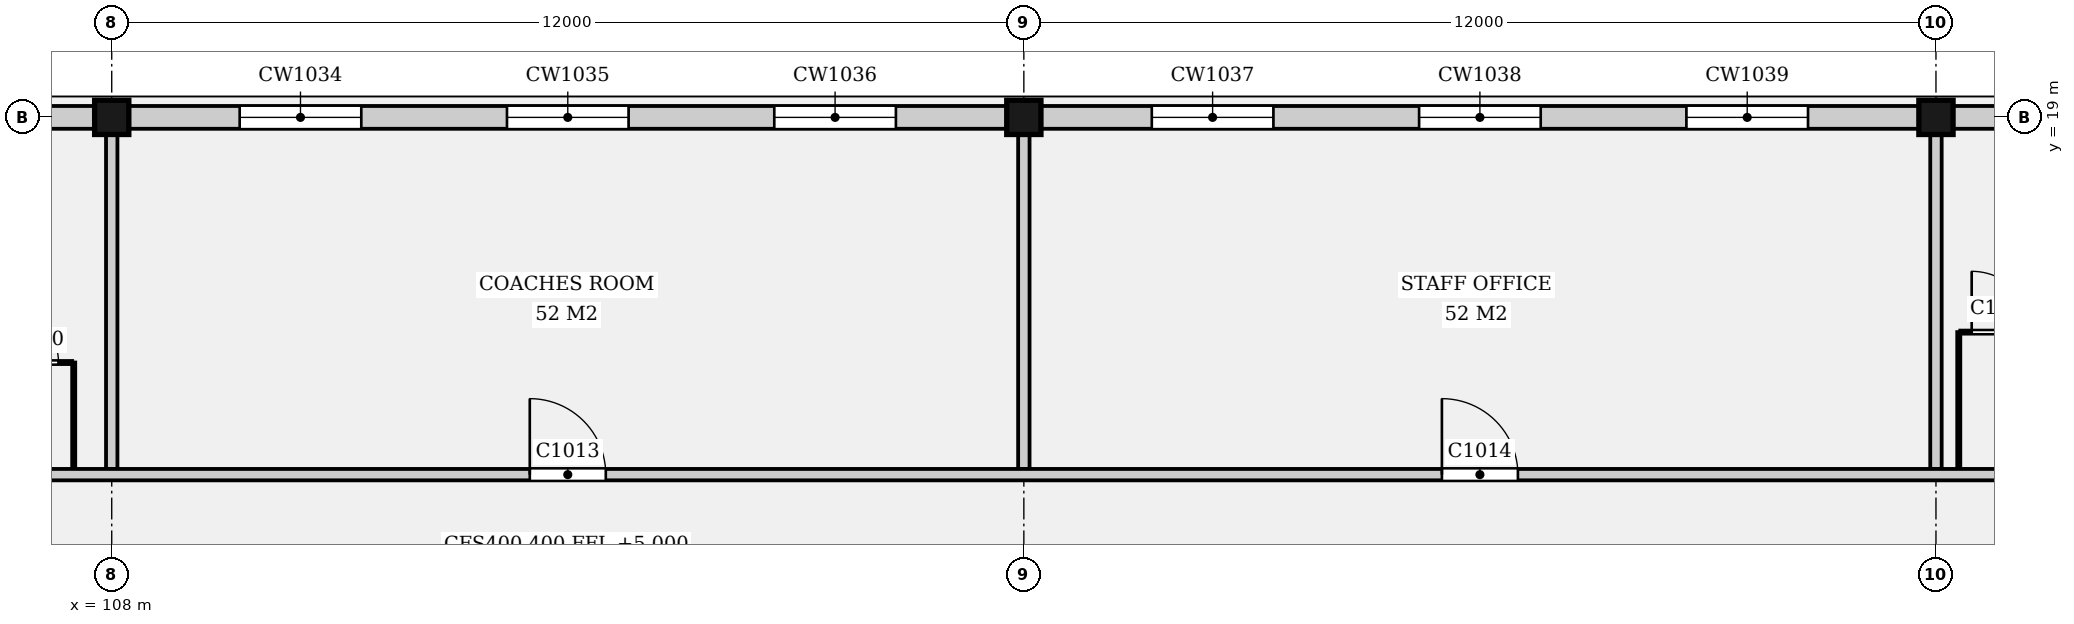
"""IFC4 building model, lengths in metres.
Left out: names, types, materials, properties, quantities, classifications, styles, units other than length and angle.
Written with IfcOpenShell. Run it as: python <this file> out.ifc"""

import sys

from ifc_helpers import new_model, si_unit, direction, frame, frame_2d, origin, origin_2d, place, context, subcontext, project, spatial, rectangle, extrude, element, fill, save


model = new_model("IFC4")
c1 = context("Model", 3, precision=1e-05, world=origin(), true_north=direction((0.0, 1.0)))
c2 = subcontext(c1, "Body", "Model", "MODEL_VIEW")
j1 = project(units=[si_unit("LENGTHUNIT", "METRE"), si_unit("PLANEANGLEUNIT", "RADIAN")], contexts=[c1])
p1 = place(None, origin())
s1 = spatial("IfcSite", under=j1, at=p1, CompositionType="ELEMENT")
p2 = place(p1, origin())
s2 = spatial("IfcBuilding", under=s1, at=p2, CompositionType="ELEMENT")
p3 = place(p2, frame((0.0, 0.0, 5.0)))
s3 = spatial("IfcBuildingStorey", under=s2, at=p3, CompositionType="ELEMENT", Elevation=5.0)
for number, where, z_axis, x_axis in (
    (1, (108.0, 19.0, 0.0), (0.0, 0.0, 1.0), (1.0, 0.0, 0.0)),
    (2, (120.0, 19.0, 0.0), (0.0, 0.0, 1.0), (1.0, 0.0, 0.0)),
    (3, (132.0, 19.0, 0.0), (0.0, 0.0, 1.0), (1.0, 0.0, 0.0)),
):
    element("IfcColumn", number, at=place(p3, frame(where, z_axis=z_axis, x_axis=x_axis)), inside=s3, PredefinedType="COLUMN", context=c2, shape_type="SweptSolid", body=[
        extrude(rectangle(XDim=0.45, YDim=0.45, at=origin_2d()), origin(), (0.0, 0.0, 1.0), 4.4),
    ])
p4 = place(p3, frame((96.225, 19.0, 0.0), z_axis=(0.0, 0.0, 1.0), x_axis=(1.0, 0.0, 0.0)))
e4 = element("IfcWall", 4, at=p4, inside=s3, PredefinedType="ELEMENTEDWALL", context=c2, shape_type="SweptSolid", body=[
    extrude(rectangle(XDim=11.55, YDim=0.3, at=frame_2d((5.775, 0.0))), origin(), (0.0, 0.0, 1.0), 3.98),
])
p5 = place(p4, frame((1.458, 0.0, 1.4)))
e5 = element("IfcOpeningElement", 5, at=p5, cuts=e4, PredefinedType="OPENING", context=c2, shape_type="SweptSolid", body=[
    extrude(rectangle(XDim=1.6, YDim=1.2, at=frame_2d((0.8, 0.6))), frame((0.0, 0.16, 0.0), z_axis=(0.0, -1.0, 0.0), x_axis=(1.0, 0.0, 0.0)), (0.0, 0.0, 1.0), 0.32),
])
p6 = place(p4, frame((4.975, 0.0, 1.4)))
e6 = element("IfcOpeningElement", 6, at=p6, cuts=e4, PredefinedType="OPENING", context=c2, shape_type="SweptSolid", body=[
    extrude(rectangle(XDim=1.6, YDim=1.2, at=frame_2d((0.8, 0.6))), frame((0.0, 0.16, 0.0), z_axis=(0.0, -1.0, 0.0), x_axis=(1.0, 0.0, 0.0)), (0.0, 0.0, 1.0), 0.32),
])
p7 = place(p4, frame((8.492, 0.0, 1.4)))
e7 = element("IfcOpeningElement", 7, at=p7, cuts=e4, PredefinedType="OPENING", context=c2, shape_type="SweptSolid", body=[
    extrude(rectangle(XDim=1.6, YDim=1.2, at=frame_2d((0.8, 0.6))), frame((0.0, 0.16, 0.0), z_axis=(0.0, -1.0, 0.0), x_axis=(1.0, 0.0, 0.0)), (0.0, 0.0, 1.0), 0.32),
])
p8 = place(p3, frame((108.225, 19.0, 0.0), z_axis=(0.0, 0.0, 1.0), x_axis=(1.0, 0.0, 0.0)))
e8 = element("IfcWall", 8, at=p8, inside=s3, PredefinedType="ELEMENTEDWALL", context=c2, shape_type="SweptSolid", body=[
    extrude(rectangle(XDim=11.55, YDim=0.3, at=frame_2d((5.775, 0.0))), origin(), (0.0, 0.0, 1.0), 3.98),
])
p9 = place(p8, frame((1.458, 0.0, 1.4)))
e9 = element("IfcOpeningElement", 9, at=p9, cuts=e8, PredefinedType="OPENING", context=c2, shape_type="SweptSolid", body=[
    extrude(rectangle(XDim=1.6, YDim=1.2, at=frame_2d((0.8, 0.6))), frame((0.0, 0.16, 0.0), z_axis=(0.0, -1.0, 0.0), x_axis=(1.0, 0.0, 0.0)), (0.0, 0.0, 1.0), 0.32),
])
p10 = place(p8, frame((4.975, 0.0, 1.4)))
e10 = element("IfcOpeningElement", 10, at=p10, cuts=e8, PredefinedType="OPENING", context=c2, shape_type="SweptSolid", body=[
    extrude(rectangle(XDim=1.6, YDim=1.2, at=frame_2d((0.8, 0.6))), frame((0.0, 0.16, 0.0), z_axis=(0.0, -1.0, 0.0), x_axis=(1.0, 0.0, 0.0)), (0.0, 0.0, 1.0), 0.32),
])
p11 = place(p8, frame((8.492, 0.0, 1.4)))
e11 = element("IfcOpeningElement", 11, at=p11, cuts=e8, PredefinedType="OPENING", context=c2, shape_type="SweptSolid", body=[
    extrude(rectangle(XDim=1.6, YDim=1.2, at=frame_2d((0.8, 0.6))), frame((0.0, 0.16, 0.0), z_axis=(0.0, -1.0, 0.0), x_axis=(1.0, 0.0, 0.0)), (0.0, 0.0, 1.0), 0.32),
])
p12 = place(p3, frame((120.225, 19.0, 0.0), z_axis=(0.0, 0.0, 1.0), x_axis=(1.0, 0.0, 0.0)))
e12 = element("IfcWall", 12, at=p12, inside=s3, PredefinedType="ELEMENTEDWALL", context=c2, shape_type="SweptSolid", body=[
    extrude(rectangle(XDim=11.55, YDim=0.3, at=frame_2d((5.775, 0.0))), origin(), (0.0, 0.0, 1.0), 3.98),
])
p13 = place(p12, frame((1.458, 0.0, 1.4)))
e13 = element("IfcOpeningElement", 13, at=p13, cuts=e12, PredefinedType="OPENING", context=c2, shape_type="SweptSolid", body=[
    extrude(rectangle(XDim=1.6, YDim=1.2, at=frame_2d((0.8, 0.6))), frame((0.0, 0.16, 0.0), z_axis=(0.0, -1.0, 0.0), x_axis=(1.0, 0.0, 0.0)), (0.0, 0.0, 1.0), 0.32),
])
p14 = place(p12, frame((4.975, 0.0, 1.4)))
e14 = element("IfcOpeningElement", 14, at=p14, cuts=e12, PredefinedType="OPENING", context=c2, shape_type="SweptSolid", body=[
    extrude(rectangle(XDim=1.6, YDim=1.2, at=frame_2d((0.8, 0.6))), frame((0.0, 0.16, 0.0), z_axis=(0.0, -1.0, 0.0), x_axis=(1.0, 0.0, 0.0)), (0.0, 0.0, 1.0), 0.32),
])
p15 = place(p12, frame((8.492, 0.0, 1.4)))
e15 = element("IfcOpeningElement", 15, at=p15, cuts=e12, PredefinedType="OPENING", context=c2, shape_type="SweptSolid", body=[
    extrude(rectangle(XDim=1.6, YDim=1.2, at=frame_2d((0.8, 0.6))), frame((0.0, 0.16, 0.0), z_axis=(0.0, -1.0, 0.0), x_axis=(1.0, 0.0, 0.0)), (0.0, 0.0, 1.0), 0.32),
])
p16 = place(p3, frame((132.225, 19.0, 0.0), z_axis=(0.0, 0.0, 1.0), x_axis=(1.0, 0.0, 0.0)))
e16 = element("IfcWall", 16, at=p16, inside=s3, PredefinedType="ELEMENTEDWALL", context=c2, shape_type="SweptSolid", body=[
    extrude(rectangle(XDim=11.55, YDim=0.3, at=frame_2d((5.775, 0.0))), origin(), (0.0, 0.0, 1.0), 3.98),
])
p17 = place(p16, frame((1.458, 0.0, 1.4)))
e17 = element("IfcOpeningElement", 17, at=p17, cuts=e16, PredefinedType="OPENING", context=c2, shape_type="SweptSolid", body=[
    extrude(rectangle(XDim=1.6, YDim=1.2, at=frame_2d((0.8, 0.6))), frame((0.0, 0.16, 0.0), z_axis=(0.0, -1.0, 0.0), x_axis=(1.0, 0.0, 0.0)), (0.0, 0.0, 1.0), 0.32),
])
p18 = place(p16, frame((4.975, 0.0, 1.4)))
e18 = element("IfcOpeningElement", 18, at=p18, cuts=e16, PredefinedType="OPENING", context=c2, shape_type="SweptSolid", body=[
    extrude(rectangle(XDim=1.6, YDim=1.2, at=frame_2d((0.8, 0.6))), frame((0.0, 0.16, 0.0), z_axis=(0.0, -1.0, 0.0), x_axis=(1.0, 0.0, 0.0)), (0.0, 0.0, 1.0), 0.32),
])
p19 = place(p16, frame((8.492, 0.0, 1.4)))
e19 = element("IfcOpeningElement", 19, at=p19, cuts=e16, PredefinedType="OPENING", context=c2, shape_type="SweptSolid", body=[
    extrude(rectangle(XDim=1.6, YDim=1.2, at=frame_2d((0.8, 0.6))), frame((0.0, 0.16, 0.0), z_axis=(0.0, -1.0, 0.0), x_axis=(1.0, 0.0, 0.0)), (0.0, 0.0, 1.0), 0.32),
])
p20 = place(p3, frame((55.3, 14.3, 0.0), z_axis=(0.0, 0.0, 1.0), x_axis=(1.0, 0.0, 0.0)))
e20 = element("IfcWall", 20, at=p20, inside=s3, PredefinedType="PARTITIONING", context=c2, shape_type="SweptSolid", body=[
    extrude(rectangle(XDim=93.4, YDim=0.15, at=frame_2d((46.7, 0.0))), origin(), (0.0, 0.0, 1.0), 3.98),
])
p21 = place(p20, frame((15.8, 0.0, 0.0)))
e21 = element("IfcOpeningElement", 21, at=p21, cuts=e20, PredefinedType="OPENING", context=c2, shape_type="SweptSolid", body=[
    extrude(rectangle(XDim=1.8, YDim=2.4, at=frame_2d((0.9, 1.2))), frame((0.0, 0.085, 0.0), z_axis=(0.0, -1.0, 0.0), x_axis=(1.0, 0.0, 0.0)), (0.0, 0.0, 1.0), 0.17),
])
p22 = place(p20, frame((32.2, 0.0, 0.0)))
e22 = element("IfcOpeningElement", 22, at=p22, cuts=e20, PredefinedType="OPENING", context=c2, shape_type="SweptSolid", body=[
    extrude(rectangle(XDim=1.0, YDim=2.1, at=frame_2d((0.5, 1.05))), frame((0.0, 0.085, 0.0), z_axis=(0.0, -1.0, 0.0), x_axis=(1.0, 0.0, 0.0)), (0.0, 0.0, 1.0), 0.17),
])
p23 = place(p20, frame((38.2, 0.0, 0.0)))
e23 = element("IfcOpeningElement", 23, at=p23, cuts=e20, PredefinedType="OPENING", context=c2, shape_type="SweptSolid", body=[
    extrude(rectangle(XDim=1.0, YDim=2.1, at=frame_2d((0.5, 1.05))), frame((0.0, 0.085, 0.0), z_axis=(0.0, -1.0, 0.0), x_axis=(1.0, 0.0, 0.0)), (0.0, 0.0, 1.0), 0.17),
])
p24 = place(p20, frame((45.7, 0.0, 0.0)))
e24 = element("IfcOpeningElement", 24, at=p24, cuts=e20, PredefinedType="OPENING", context=c2, shape_type="SweptSolid", body=[
    extrude(rectangle(XDim=0.9, YDim=2.1, at=frame_2d((0.45, 1.05))), frame((0.0, 0.085, 0.0), z_axis=(0.0, -1.0, 0.0), x_axis=(1.0, 0.0, 0.0)), (0.0, 0.0, 1.0), 0.17),
])
p25 = place(p20, frame((58.2, 0.0, 0.0)))
e25 = element("IfcOpeningElement", 25, at=p25, cuts=e20, PredefinedType="OPENING", context=c2, shape_type="SweptSolid", body=[
    extrude(rectangle(XDim=1.0, YDim=2.1, at=frame_2d((0.5, 1.05))), frame((0.0, 0.085, 0.0), z_axis=(0.0, -1.0, 0.0), x_axis=(1.0, 0.0, 0.0)), (0.0, 0.0, 1.0), 0.17),
])
p26 = place(p20, frame((70.2, 0.0, 0.0)))
e26 = element("IfcOpeningElement", 26, at=p26, cuts=e20, PredefinedType="OPENING", context=c2, shape_type="SweptSolid", body=[
    extrude(rectangle(XDim=1.0, YDim=2.1, at=frame_2d((0.5, 1.05))), frame((0.0, 0.085, 0.0), z_axis=(0.0, -1.0, 0.0), x_axis=(1.0, 0.0, 0.0)), (0.0, 0.0, 1.0), 0.17),
])
p27 = place(p20, frame((81.68, 0.0, 0.0)))
e27 = element("IfcOpeningElement", 27, at=p27, cuts=e20, PredefinedType="OPENING", context=c2, shape_type="SweptSolid", body=[
    extrude(rectangle(XDim=0.9, YDim=2.1, at=frame_2d((0.45, 1.05))), frame((0.0, 0.085, 0.0), z_axis=(0.0, -1.0, 0.0), x_axis=(1.0, 0.0, 0.0)), (0.0, 0.0, 1.0), 0.17),
])
for number, where, z_axis, x_axis in (
    (28, (108.0, 14.375, 0.0), (0.0, 0.0, 1.0), (0.0, 1.0, 0.0)),
    (29, (120.0, 14.375, 0.0), (0.0, 0.0, 1.0), (0.0, 1.0, 0.0)),
    (30, (132.0, 14.375, 0.0), (0.0, 0.0, 1.0), (0.0, 1.0, 0.0)),
):
    element("IfcWall", number, at=place(p3, frame(where, z_axis=z_axis, x_axis=x_axis)), inside=s3, PredefinedType="PARTITIONING", context=c2, shape_type="SweptSolid", body=[
        extrude(rectangle(XDim=4.4, YDim=0.15, at=frame_2d((2.2, 0.0))), origin(), (0.0, 0.0, 1.0), 3.98),
    ])
p28 = place(p3, frame((107.5, 14.375, 0.0), z_axis=(0.0, 0.0, 1.0), x_axis=(0.0, 1.0, 0.0)))
e31 = element("IfcWall", 31, at=p28, inside=s3, PredefinedType="PARTITIONING", context=c2, shape_type="SweptSolid", body=[
    extrude(rectangle(XDim=1.4, YDim=0.04, at=frame_2d((0.7, 0.0))), origin(), (0.0, 0.0, 1.0), 2.4),
])
p29 = place(p3, frame((106.42, 15.775, 0.0), z_axis=(0.0, 0.0, 1.0), x_axis=(1.0, 0.0, 0.0)))
e32 = element("IfcWall", 32, at=p29, inside=s3, PredefinedType="PARTITIONING", context=c2, shape_type="SweptSolid", body=[
    extrude(rectangle(XDim=1.06, YDim=0.04, at=frame_2d((0.53, 0.0))), origin(), (0.0, 0.0, 1.0), 2.4),
])
p30 = place(p29, frame((0.18, 0.0, 0.0)))
e33 = element("IfcOpeningElement", 33, at=p30, cuts=e32, PredefinedType="OPENING", context=c2, shape_type="SweptSolid", body=[
    extrude(rectangle(XDim=0.7, YDim=2.0, at=frame_2d((0.35, 1.0))), frame((0.0, 0.03, 0.0), z_axis=(0.0, -1.0, 0.0), x_axis=(1.0, 0.0, 0.0)), (0.0, 0.0, 1.0), 0.06),
])
p31 = place(p3, frame((132.3, 14.375, 0.0), z_axis=(0.0, 0.0, 1.0), x_axis=(0.0, 1.0, 0.0)))
e34 = element("IfcWall", 34, at=p31, inside=s3, PredefinedType="PARTITIONING", context=c2, shape_type="SweptSolid", body=[
    extrude(rectangle(XDim=1.8, YDim=0.04, at=frame_2d((0.9, 0.0))), origin(), (0.0, 0.0, 1.0), 2.4),
])
p32 = place(p3, frame((132.32, 16.175, 0.0), z_axis=(0.0, 0.0, 1.0), x_axis=(1.0, 0.0, 0.0)))
e35 = element("IfcWall", 35, at=p32, inside=s3, PredefinedType="PARTITIONING", context=c2, shape_type="SweptSolid", body=[
    extrude(rectangle(XDim=1.1, YDim=0.04, at=frame_2d((0.55, 0.0))), origin(), (0.0, 0.0, 1.0), 2.4),
])
p33 = place(p32, frame((0.15, 0.0, 0.0)))
e36 = element("IfcOpeningElement", 36, at=p33, cuts=e35, PredefinedType="OPENING", context=c2, shape_type="SweptSolid", body=[
    extrude(rectangle(XDim=0.8, YDim=2.0, at=frame_2d((0.4, 1.0))), frame((0.0, 0.03, 0.0), z_axis=(0.0, -1.0, 0.0), x_axis=(1.0, 0.0, 0.0)), (0.0, 0.0, 1.0), 0.06),
])
p34 = place(p9, origin())
e37 = element("IfcWindow", 37, at=p34, inside=s3, PartitioningType="SINGLE_PANEL", PredefinedType="WINDOW", context=c2, shape_type="SweptSolid", body=[
    extrude(rectangle(XDim=1.6, YDim=1.2, at=frame_2d((0.8, 0.6))), frame((0.0, 0.03, 0.0), z_axis=(0.0, -1.0, 0.0), x_axis=(1.0, 0.0, 0.0)), (0.0, 0.0, 1.0), 0.06),
])
fill(e9, e37)
p35 = place(p10, origin())
e38 = element("IfcWindow", 38, at=p35, inside=s3, PartitioningType="SINGLE_PANEL", PredefinedType="WINDOW", context=c2, shape_type="SweptSolid", body=[
    extrude(rectangle(XDim=1.6, YDim=1.2, at=frame_2d((0.8, 0.6))), frame((0.0, 0.03, 0.0), z_axis=(0.0, -1.0, 0.0), x_axis=(1.0, 0.0, 0.0)), (0.0, 0.0, 1.0), 0.06),
])
fill(e10, e38)
p36 = place(p11, origin())
e39 = element("IfcWindow", 39, at=p36, inside=s3, PartitioningType="SINGLE_PANEL", PredefinedType="WINDOW", context=c2, shape_type="SweptSolid", body=[
    extrude(rectangle(XDim=1.6, YDim=1.2, at=frame_2d((0.8, 0.6))), frame((0.0, 0.03, 0.0), z_axis=(0.0, -1.0, 0.0), x_axis=(1.0, 0.0, 0.0)), (0.0, 0.0, 1.0), 0.06),
])
fill(e11, e39)
p37 = place(p13, origin())
e40 = element("IfcWindow", 40, at=p37, inside=s3, PartitioningType="SINGLE_PANEL", PredefinedType="WINDOW", context=c2, shape_type="SweptSolid", body=[
    extrude(rectangle(XDim=1.6, YDim=1.2, at=frame_2d((0.8, 0.6))), frame((0.0, 0.03, 0.0), z_axis=(0.0, -1.0, 0.0), x_axis=(1.0, 0.0, 0.0)), (0.0, 0.0, 1.0), 0.06),
])
fill(e13, e40)
p38 = place(p14, origin())
e41 = element("IfcWindow", 41, at=p38, inside=s3, PartitioningType="SINGLE_PANEL", PredefinedType="WINDOW", context=c2, shape_type="SweptSolid", body=[
    extrude(rectangle(XDim=1.6, YDim=1.2, at=frame_2d((0.8, 0.6))), frame((0.0, 0.03, 0.0), z_axis=(0.0, -1.0, 0.0), x_axis=(1.0, 0.0, 0.0)), (0.0, 0.0, 1.0), 0.06),
])
fill(e14, e41)
p39 = place(p15, origin())
e42 = element("IfcWindow", 42, at=p39, inside=s3, PartitioningType="SINGLE_PANEL", PredefinedType="WINDOW", context=c2, shape_type="SweptSolid", body=[
    extrude(rectangle(XDim=1.6, YDim=1.2, at=frame_2d((0.8, 0.6))), frame((0.0, 0.03, 0.0), z_axis=(0.0, -1.0, 0.0), x_axis=(1.0, 0.0, 0.0)), (0.0, 0.0, 1.0), 0.06),
])
fill(e15, e42)
p40 = place(p25, origin())
e43 = element("IfcDoor", 43, at=p40, inside=s3, OperationType="SINGLE_SWING_LEFT", PredefinedType="DOOR", context=c2, shape_type="SweptSolid", body=[
    extrude(rectangle(XDim=1.0, YDim=2.1, at=frame_2d((0.5, 1.05))), frame((0.0, 0.025, 0.0), z_axis=(0.0, -1.0, 0.0), x_axis=(1.0, 0.0, 0.0)), (0.0, 0.0, 1.0), 0.05),
])
fill(e25, e43)
p41 = place(p26, origin())
e44 = element("IfcDoor", 44, at=p41, inside=s3, OperationType="SINGLE_SWING_LEFT", PredefinedType="DOOR", context=c2, shape_type="SweptSolid", body=[
    extrude(rectangle(XDim=1.0, YDim=2.1, at=frame_2d((0.5, 1.05))), frame((0.0, 0.025, 0.0), z_axis=(0.0, -1.0, 0.0), x_axis=(1.0, 0.0, 0.0)), (0.0, 0.0, 1.0), 0.05),
])
fill(e26, e44)
p42 = place(p30, origin())
e45 = element("IfcDoor", 45, at=p42, inside=s3, OperationType="SINGLE_SWING_LEFT", PredefinedType="DOOR", context=c2, shape_type="SweptSolid", body=[
    extrude(rectangle(XDim=0.7, YDim=2.0, at=frame_2d((0.35, 1.0))), frame((0.0, 0.02, 0.0), z_axis=(0.0, -1.0, 0.0), x_axis=(1.0, 0.0, 0.0)), (0.0, 0.0, 1.0), 0.04),
])
fill(e33, e45)
p43 = place(p33, origin())
e46 = element("IfcDoor", 46, at=p43, inside=s3, OperationType="SINGLE_SWING_LEFT", PredefinedType="DOOR", context=c2, shape_type="SweptSolid", body=[
    extrude(rectangle(XDim=0.8, YDim=2.0, at=frame_2d((0.4, 1.0))), frame((0.0, 0.02, 0.0), z_axis=(0.0, -1.0, 0.0), x_axis=(1.0, 0.0, 0.0)), (0.0, 0.0, 1.0), 0.04),
])
fill(e36, e46)
save(model, sys.argv[1])
